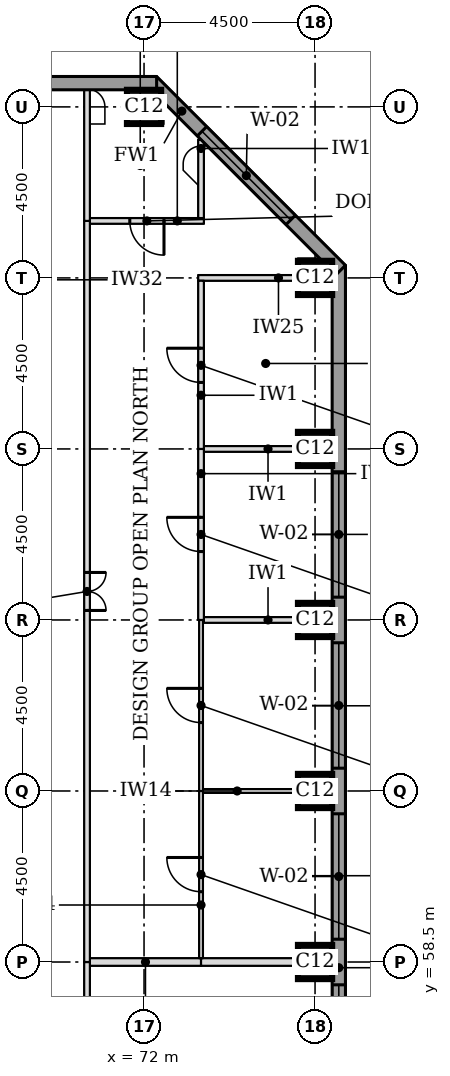
"""IFC4 building model, lengths in metres.
Left out: names, types, materials, properties, quantities, classifications, styles, units other than length and angle.
Written with IfcOpenShell. Run it as: python <this file> out.ifc"""

import sys

from ifc_helpers import new_model, si_unit, direction, frame, frame_2d, origin, origin_2d, place, context, subcontext, project, spatial, rectangle, extrude, element, fill, save


model = new_model("IFC4")
c1 = context("Model", 3, precision=1e-05, world=origin(), true_north=direction((0.0, 1.0)))
c2 = subcontext(c1, "Body", "Model", "MODEL_VIEW")
j1 = project(units=[si_unit("LENGTHUNIT", "METRE"), si_unit("PLANEANGLEUNIT", "RADIAN")], contexts=[c1])
p1 = place(None, origin())
s1 = spatial("IfcSite", under=j1, at=p1, CompositionType="ELEMENT")
p2 = place(p1, origin())
s2 = spatial("IfcBuilding", under=s1, at=p2, CompositionType="ELEMENT")
p3 = place(p2, frame((0.0, 0.0, 223.0)))
s3 = spatial("IfcBuildingStorey", under=s2, at=p3, CompositionType="ELEMENT", Elevation=223.0)
for number, where, z_axis, x_axis in (
    (1, (76.5, 58.5, 0.0), (0.0, 0.0, 1.0), (1.0, 0.0, 0.0)),
    (2, (76.5, 63.0, 0.0), (0.0, 0.0, 1.0), (1.0, 0.0, 0.0)),
    (3, (76.5, 67.5, 0.0), (0.0, 0.0, 1.0), (1.0, 0.0, 0.0)),
    (4, (76.5, 72.0, 0.0), (0.0, 0.0, 1.0), (1.0, 0.0, 0.0)),
    (5, (76.5, 76.5, 0.0), (0.0, 0.0, 1.0), (1.0, 0.0, 0.0)),
    (6, (72.0, 81.0, 0.0), (0.0, 0.0, 1.0), (1.0, 0.0, 0.0)),
):
    element("IfcColumn", number, at=place(p3, frame(where, z_axis=z_axis, x_axis=x_axis)), inside=s3, PredefinedType="COLUMN", context=c2, shape_type="SweptSolid", body=[
        extrude(rectangle(XDim=0.9, YDim=0.9, at=origin_2d()), origin(), (0.0, 0.0, 1.0), 3.7),
    ])
p4 = place(p3, frame((77.125, 44.669, 0.0), z_axis=(0.0, 0.0, 1.0), x_axis=(0.0, 1.0, 0.0)))
e7 = element("IfcWall", 7, at=p4, inside=s3, PredefinedType="STANDARD", context=c2, shape_type="SweptSolid", body=[
    extrude(rectangle(XDim=32.163, YDim=0.35, at=frame_2d((16.081, 0.0))), origin(), (0.0, 0.0, 1.0), 3.525),
])
p5 = place(p4, frame((5.431, 0.0, 0.9)))
e8 = element("IfcOpeningElement", 8, at=p5, cuts=e7, PredefinedType="OPENING", context=c2, shape_type="SweptSolid", body=[
    extrude(rectangle(XDim=3.3, YDim=1.9, at=frame_2d((1.65, 0.95))), frame((0.0, 0.185, 0.0), z_axis=(0.0, -1.0, 0.0), x_axis=(1.0, 0.0, 0.0)), (0.0, 0.0, 1.0), 0.37),
])
p6 = place(p4, frame((9.931, 0.0, 0.9)))
e9 = element("IfcOpeningElement", 9, at=p6, cuts=e7, PredefinedType="OPENING", context=c2, shape_type="SweptSolid", body=[
    extrude(rectangle(XDim=3.3, YDim=1.9, at=frame_2d((1.65, 0.95))), frame((0.0, 0.185, 0.0), z_axis=(0.0, -1.0, 0.0), x_axis=(1.0, 0.0, 0.0)), (0.0, 0.0, 1.0), 0.37),
])
p7 = place(p4, frame((14.431, 0.0, 0.9)))
e10 = element("IfcOpeningElement", 10, at=p7, cuts=e7, PredefinedType="OPENING", context=c2, shape_type="SweptSolid", body=[
    extrude(rectangle(XDim=3.3, YDim=1.9, at=frame_2d((1.65, 0.95))), frame((0.0, 0.185, 0.0), z_axis=(0.0, -1.0, 0.0), x_axis=(1.0, 0.0, 0.0)), (0.0, 0.0, 1.0), 0.37),
])
p8 = place(p4, frame((18.931, 0.0, 0.9)))
e11 = element("IfcOpeningElement", 11, at=p8, cuts=e7, PredefinedType="OPENING", context=c2, shape_type="SweptSolid", body=[
    extrude(rectangle(XDim=3.3, YDim=1.9, at=frame_2d((1.65, 0.95))), frame((0.0, 0.185, 0.0), z_axis=(0.0, -1.0, 0.0), x_axis=(1.0, 0.0, 0.0)), (0.0, 0.0, 1.0), 0.37),
])
p9 = place(p4, frame((23.431, 0.0, 0.9)))
e12 = element("IfcOpeningElement", 12, at=p9, cuts=e7, PredefinedType="OPENING", context=c2, shape_type="SweptSolid", body=[
    extrude(rectangle(XDim=3.3, YDim=1.9, at=frame_2d((1.65, 0.95))), frame((0.0, 0.185, 0.0), z_axis=(0.0, -1.0, 0.0), x_axis=(1.0, 0.0, 0.0)), (0.0, 0.0, 1.0), 0.37),
])
p10 = place(p3, frame((77.176, 76.708, 0.0), z_axis=(0.0, 0.0, 1.0), x_axis=(-0.707106781187, 0.707106781187, 0.0)))
e13 = element("IfcWall", 13, at=p10, inside=s3, PredefinedType="STANDARD", context=c2, shape_type="SweptSolid", body=[
    extrude(rectangle(XDim=7.027, YDim=0.35, at=frame_2d((3.513, 0.0))), origin(), (0.0, 0.0, 1.0), 3.525),
])
p11 = place(p10, frame((1.863, 0.0, 0.9)))
e14 = element("IfcOpeningElement", 14, at=p11, cuts=e13, PredefinedType="OPENING", context=c2, shape_type="SweptSolid", body=[
    extrude(rectangle(XDim=3.3, YDim=1.9, at=frame_2d((1.65, 0.95))), frame((0.0, 0.185, 0.0), z_axis=(0.0, -1.0, 0.0), x_axis=(1.0, 0.0, 0.0)), (0.0, 0.0, 1.0), 0.37),
])
p12 = place(p3, frame((72.331, 81.625, 0.0), z_axis=(0.0, 0.0, 1.0), x_axis=(-1.0, 0.0, 0.0)))
e15 = element("IfcWall", 15, at=p12, inside=s3, PredefinedType="STANDARD", context=c2, shape_type="SweptSolid", body=[
    extrude(rectangle(XDim=32.163, YDim=0.35, at=frame_2d((16.081, 0.0))), origin(), (0.0, 0.0, 1.0), 3.525),
])
p13 = place(p12, frame((5.431, 0.0, 0.9)))
e16 = element("IfcOpeningElement", 16, at=p13, cuts=e15, PredefinedType="OPENING", context=c2, shape_type="SweptSolid", body=[
    extrude(rectangle(XDim=3.3, YDim=1.9, at=frame_2d((1.65, 0.95))), frame((0.0, 0.185, 0.0), z_axis=(0.0, -1.0, 0.0), x_axis=(1.0, 0.0, 0.0)), (0.0, 0.0, 1.0), 0.37),
])
p14 = place(p12, frame((9.931, 0.0, 0.9)))
e17 = element("IfcOpeningElement", 17, at=p14, cuts=e15, PredefinedType="OPENING", context=c2, shape_type="SweptSolid", body=[
    extrude(rectangle(XDim=3.3, YDim=1.9, at=frame_2d((1.65, 0.95))), frame((0.0, 0.185, 0.0), z_axis=(0.0, -1.0, 0.0), x_axis=(1.0, 0.0, 0.0)), (0.0, 0.0, 1.0), 0.37),
])
p15 = place(p12, frame((14.431, 0.0, 0.9)))
e18 = element("IfcOpeningElement", 18, at=p15, cuts=e15, PredefinedType="OPENING", context=c2, shape_type="SweptSolid", body=[
    extrude(rectangle(XDim=3.3, YDim=1.9, at=frame_2d((1.65, 0.95))), frame((0.0, 0.185, 0.0), z_axis=(0.0, -1.0, 0.0), x_axis=(1.0, 0.0, 0.0)), (0.0, 0.0, 1.0), 0.37),
])
p16 = place(p12, frame((18.931, 0.0, 0.9)))
e19 = element("IfcOpeningElement", 19, at=p16, cuts=e15, PredefinedType="OPENING", context=c2, shape_type="SweptSolid", body=[
    extrude(rectangle(XDim=3.3, YDim=1.9, at=frame_2d((1.65, 0.95))), frame((0.0, 0.185, 0.0), z_axis=(0.0, -1.0, 0.0), x_axis=(1.0, 0.0, 0.0)), (0.0, 0.0, 1.0), 0.37),
])
p17 = place(p12, frame((23.431, 0.0, 0.9)))
e20 = element("IfcOpeningElement", 20, at=p17, cuts=e15, PredefinedType="OPENING", context=c2, shape_type="SweptSolid", body=[
    extrude(rectangle(XDim=3.3, YDim=1.9, at=frame_2d((1.65, 0.95))), frame((0.0, 0.185, 0.0), z_axis=(0.0, -1.0, 0.0), x_axis=(1.0, 0.0, 0.0)), (0.0, 0.0, 1.0), 0.37),
])
p18 = place(p3, frame((70.575, 58.5, 0.0), z_axis=(0.0, 0.0, 1.0), x_axis=(1.0, 0.0, 0.0)))
e21 = element("IfcWall", 21, at=p18, inside=s3, PredefinedType="PARTITIONING", context=c2, shape_type="SweptSolid", body=[
    extrude(rectangle(XDim=2.925, YDim=0.2, at=frame_2d((1.462, 0.0))), origin(), (0.0, 0.0, 1.0), 3.55),
])
p19 = place(p3, frame((73.5, 58.5, 0.0), z_axis=(0.0, 0.0, 1.0), x_axis=(1.0, 0.0, 0.0)))
e22 = element("IfcWall", 22, at=p19, inside=s3, PredefinedType="PARTITIONING", context=c2, shape_type="SweptSolid", body=[
    extrude(rectangle(XDim=3.45, YDim=0.2, at=frame_2d((1.725, 0.0))), origin(), (0.0, 0.0, 1.0), 3.55),
])
p20 = place(p3, frame((73.55, 63.0, 0.0), z_axis=(0.0, 0.0, 1.0), x_axis=(1.0, 0.0, 0.0)))
e23 = element("IfcWall", 23, at=p20, inside=s3, PredefinedType="PARTITIONING", context=c2, shape_type="SweptSolid", body=[
    extrude(rectangle(XDim=3.4, YDim=0.1, at=frame_2d((1.7, 0.0))), origin(), (0.0, 0.0, 1.0), 3.55),
])
for number, where, z_axis, x_axis in (
    (24, (73.575, 67.5, 0.0), (0.0, 0.0, 1.0), (1.0, 0.0, 0.0)),
    (25, (73.575, 72.0, 0.0), (0.0, 0.0, 1.0), (1.0, 0.0, 0.0)),
):
    element("IfcWall", number, at=place(p3, frame(where, z_axis=z_axis, x_axis=x_axis)), inside=s3, PredefinedType="PARTITIONING", context=c2, shape_type="SweptSolid", body=[
        extrude(rectangle(XDim=3.375, YDim=0.15, at=frame_2d((1.688, 0.0))), origin(), (0.0, 0.0, 1.0), 3.55),
    ])
p21 = place(p3, frame((73.425, 76.5, 0.0), z_axis=(0.0, 0.0, 1.0), x_axis=(1.0, 0.0, 0.0)))
e26 = element("IfcWall", 26, at=p21, inside=s3, PredefinedType="PARTITIONING", context=c2, shape_type="SweptSolid", body=[
    extrude(rectangle(XDim=2.625, YDim=0.15, at=frame_2d((1.312, 0.0))), origin(), (0.0, 0.0, 1.0), 3.096),
])
p22 = place(p3, frame((70.575, 78.0, 0.0), z_axis=(0.0, 0.0, 1.0), x_axis=(1.0, 0.0, 0.0)))
e27 = element("IfcWall", 27, at=p22, inside=s3, PredefinedType="PARTITIONING", context=c2, shape_type="SweptSolid", body=[
    extrude(rectangle(XDim=3.0, YDim=0.15, at=frame_2d((1.5, 0.0))), origin(), (0.0, 0.0, 1.0), 3.55),
])
p23 = place(p22, frame((1.05, 0.0, 0.0)))
e28 = element("IfcOpeningElement", 28, at=p23, cuts=e27, PredefinedType="OPENING", context=c2, shape_type="SweptSolid", body=[
    extrude(rectangle(XDim=0.9, YDim=2.1, at=frame_2d((0.45, 1.05))), frame((0.0, 0.085, 0.0), z_axis=(0.0, -1.0, 0.0), x_axis=(1.0, 0.0, 0.0)), (0.0, 0.0, 1.0), 0.17),
])
p24 = place(p3, frame((70.5, 45.0, 0.0), z_axis=(0.0, 0.0, 1.0), x_axis=(0.0, 1.0, 0.0)))
e29 = element("IfcWall", 29, at=p24, inside=s3, PredefinedType="PARTITIONING", context=c2, shape_type="SweptSolid", body=[
    extrude(rectangle(XDim=13.5, YDim=0.15, at=frame_2d((6.75, 0.0))), origin(), (0.0, 0.0, 1.0), 3.55),
])
p25 = place(p24, frame((6.25, 0.0, 0.0)))
e30 = element("IfcOpeningElement", 30, at=p25, cuts=e29, PredefinedType="OPENING", context=c2, shape_type="SweptSolid", body=[
    extrude(rectangle(XDim=1.0, YDim=2.1, at=frame_2d((0.5, 1.05))), frame((0.0, 0.085, 0.0), z_axis=(0.0, -1.0, 0.0), x_axis=(1.0, 0.0, 0.0)), (0.0, 0.0, 1.0), 0.17),
])
p26 = place(p3, frame((70.5, 58.5, 0.0), z_axis=(0.0, 0.0, 1.0), x_axis=(0.0, 1.0, 0.0)))
e31 = element("IfcWall", 31, at=p26, inside=s3, PredefinedType="PARTITIONING", context=c2, shape_type="SweptSolid", body=[
    extrude(rectangle(XDim=19.5, YDim=0.15, at=frame_2d((9.75, 0.0))), origin(), (0.0, 0.0, 1.0), 3.55),
])
p27 = place(p26, frame((9.25, 0.0, 0.0)))
e32 = element("IfcOpeningElement", 32, at=p27, cuts=e31, PredefinedType="OPENING", context=c2, shape_type="SweptSolid", body=[
    extrude(rectangle(XDim=1.0, YDim=2.1, at=frame_2d((0.5, 1.05))), frame((0.0, 0.085, 0.0), z_axis=(0.0, -1.0, 0.0), x_axis=(1.0, 0.0, 0.0)), (0.0, 0.0, 1.0), 0.17),
])
p28 = place(p3, frame((73.5, 58.6, 0.0), z_axis=(0.0, 0.0, 1.0), x_axis=(0.0, 1.0, 0.0)))
e33 = element("IfcWall", 33, at=p28, inside=s3, PredefinedType="PARTITIONING", context=c2, shape_type="SweptSolid", body=[
    extrude(rectangle(XDim=4.4, YDim=0.1, at=frame_2d((2.2, 0.0))), origin(), (0.0, 0.0, 1.0), 3.55),
])
p29 = place(p28, frame((1.75, 0.0, 0.0)))
e34 = element("IfcOpeningElement", 34, at=p29, cuts=e33, PredefinedType="OPENING", context=c2, shape_type="SweptSolid", body=[
    extrude(rectangle(XDim=0.9, YDim=2.1, at=frame_2d((0.45, 1.05))), frame((0.0, 0.06, 0.0), z_axis=(0.0, -1.0, 0.0), x_axis=(1.0, 0.0, 0.0)), (0.0, 0.0, 1.0), 0.12),
])
p30 = place(p3, frame((73.5, 63.0, 0.0), z_axis=(0.0, 0.0, 1.0), x_axis=(0.0, 1.0, 0.0)))
e35 = element("IfcWall", 35, at=p30, inside=s3, PredefinedType="PARTITIONING", context=c2, shape_type="SweptSolid", body=[
    extrude(rectangle(XDim=4.5, YDim=0.1, at=frame_2d((2.25, 0.0))), origin(), (0.0, 0.0, 1.0), 3.55),
])
p31 = place(p30, frame((1.8, 0.0, 0.0)))
e36 = element("IfcOpeningElement", 36, at=p31, cuts=e35, PredefinedType="OPENING", context=c2, shape_type="SweptSolid", body=[
    extrude(rectangle(XDim=0.9, YDim=2.1, at=frame_2d((0.45, 1.05))), frame((0.0, 0.06, 0.0), z_axis=(0.0, -1.0, 0.0), x_axis=(1.0, 0.0, 0.0)), (0.0, 0.0, 1.0), 0.12),
])
p32 = place(p3, frame((73.5, 67.5, 0.0), z_axis=(0.0, 0.0, 1.0), x_axis=(0.0, 1.0, 0.0)))
e37 = element("IfcWall", 37, at=p32, inside=s3, PredefinedType="PARTITIONING", context=c2, shape_type="SweptSolid", body=[
    extrude(rectangle(XDim=4.5, YDim=0.15, at=frame_2d((2.25, 0.0))), origin(), (0.0, 0.0, 1.0), 3.55),
])
p33 = place(p32, frame((1.8, 0.0, 0.0)))
e38 = element("IfcOpeningElement", 38, at=p33, cuts=e37, PredefinedType="OPENING", context=c2, shape_type="SweptSolid", body=[
    extrude(rectangle(XDim=0.9, YDim=2.1, at=frame_2d((0.45, 1.05))), frame((0.0, 0.085, 0.0), z_axis=(0.0, -1.0, 0.0), x_axis=(1.0, 0.0, 0.0)), (0.0, 0.0, 1.0), 0.17),
])
p34 = place(p3, frame((73.5, 72.0, 0.0), z_axis=(0.0, 0.0, 1.0), x_axis=(0.0, 1.0, 0.0)))
e39 = element("IfcWall", 39, at=p34, inside=s3, PredefinedType="PARTITIONING", context=c2, shape_type="SweptSolid", body=[
    extrude(rectangle(XDim=4.425, YDim=0.15, at=frame_2d((2.212, 0.0))), origin(), (0.0, 0.0, 1.0), 3.55),
])
p35 = place(p34, frame((1.75, 0.0, 0.0)))
e40 = element("IfcOpeningElement", 40, at=p35, cuts=e39, PredefinedType="OPENING", context=c2, shape_type="SweptSolid", body=[
    extrude(rectangle(XDim=0.9, YDim=2.1, at=frame_2d((0.45, 1.05))), frame((0.0, 0.085, 0.0), z_axis=(0.0, -1.0, 0.0), x_axis=(1.0, 0.0, 0.0)), (0.0, 0.0, 1.0), 0.17),
])
p36 = place(p3, frame((70.5, 78.0, 0.0), z_axis=(0.0, 0.0, 1.0), x_axis=(0.0, 1.0, 0.0)))
e41 = element("IfcWall", 41, at=p36, inside=s3, PredefinedType="PARTITIONING", context=c2, shape_type="SweptSolid", body=[
    extrude(rectangle(XDim=3.45, YDim=0.15, at=frame_2d((1.725, 0.0))), origin(), (0.0, 0.0, 1.0), 3.55),
])
p37 = place(p3, frame((73.5, 78.075, 0.0), z_axis=(0.0, 0.0, 1.0), x_axis=(0.0, 1.0, 0.0)))
e42 = element("IfcWall", 42, at=p37, inside=s3, PredefinedType="PARTITIONING", context=c2, shape_type="SweptSolid", body=[
    extrude(rectangle(XDim=2.062, YDim=0.15, at=frame_2d((1.031, 0.0))), origin(), (0.0, 0.0, 1.0), 3.55),
])
p38 = place(p6, origin())
e43 = element("IfcWindow", 43, at=p38, inside=s3, PartitioningType="SINGLE_PANEL", PredefinedType="WINDOW", context=c2, shape_type="SweptSolid", body=[
    extrude(rectangle(XDim=3.3, YDim=1.9, at=frame_2d((1.65, 0.95))), frame((0.0, 0.085, 0.0), z_axis=(0.0, -1.0, 0.0), x_axis=(1.0, 0.0, 0.0)), (0.0, 0.0, 1.0), 0.06),
])
fill(e9, e43)
p39 = place(p7, origin())
e44 = element("IfcWindow", 44, at=p39, inside=s3, PartitioningType="SINGLE_PANEL", PredefinedType="WINDOW", context=c2, shape_type="SweptSolid", body=[
    extrude(rectangle(XDim=3.3, YDim=1.9, at=frame_2d((1.65, 0.95))), frame((0.0, 0.085, 0.0), z_axis=(0.0, -1.0, 0.0), x_axis=(1.0, 0.0, 0.0)), (0.0, 0.0, 1.0), 0.06),
])
fill(e10, e44)
p40 = place(p8, origin())
e45 = element("IfcWindow", 45, at=p40, inside=s3, PartitioningType="SINGLE_PANEL", PredefinedType="WINDOW", context=c2, shape_type="SweptSolid", body=[
    extrude(rectangle(XDim=3.3, YDim=1.9, at=frame_2d((1.65, 0.95))), frame((0.0, 0.085, 0.0), z_axis=(0.0, -1.0, 0.0), x_axis=(1.0, 0.0, 0.0)), (0.0, 0.0, 1.0), 0.06),
])
fill(e11, e45)
p41 = place(p9, origin())
e46 = element("IfcWindow", 46, at=p41, inside=s3, PartitioningType="SINGLE_PANEL", PredefinedType="WINDOW", context=c2, shape_type="SweptSolid", body=[
    extrude(rectangle(XDim=3.3, YDim=1.9, at=frame_2d((1.65, 0.95))), frame((0.0, 0.085, 0.0), z_axis=(0.0, -1.0, 0.0), x_axis=(1.0, 0.0, 0.0)), (0.0, 0.0, 1.0), 0.06),
])
fill(e12, e46)
p42 = place(p11, origin())
e47 = element("IfcWindow", 47, at=p42, inside=s3, PartitioningType="SINGLE_PANEL", PredefinedType="WINDOW", context=c2, shape_type="SweptSolid", body=[
    extrude(rectangle(XDim=3.3, YDim=1.9, at=frame_2d((1.65, 0.95))), frame((0.0, 0.085, 0.0), z_axis=(0.0, -1.0, 0.0), x_axis=(1.0, 0.0, 0.0)), (0.0, 0.0, 1.0), 0.06),
])
fill(e14, e47)
p43 = place(p27, frame((1.0, 0.0, 0.0), z_axis=(0.0, 0.0, 1.0), x_axis=(-1.0, 0.0, 0.0)))
e48 = element("IfcDoor", 48, at=p43, inside=s3, OperationType="DOUBLE_DOOR_SINGLE_SWING", PredefinedType="DOOR", context=c2, shape_type="SweptSolid", body=[
    extrude(rectangle(XDim=1.0, YDim=2.1, at=frame_2d((0.5, 1.05))), frame((0.0, 0.025, 0.0), z_axis=(0.0, -1.0, 0.0), x_axis=(1.0, 0.0, 0.0)), (0.0, 0.0, 1.0), 0.05),
])
fill(e32, e48)
p44 = place(p29, origin())
e49 = element("IfcDoor", 49, at=p44, inside=s3, OperationType="SINGLE_SWING_RIGHT", PredefinedType="DOOR", context=c2, shape_type="SweptSolid", body=[
    extrude(rectangle(XDim=0.9, YDim=2.1, at=frame_2d((0.45, 1.05))), frame((0.0, 0.025, 0.0), z_axis=(0.0, -1.0, 0.0), x_axis=(1.0, 0.0, 0.0)), (0.0, 0.0, 1.0), 0.05),
])
fill(e34, e49)
p45 = place(p31, origin())
e50 = element("IfcDoor", 50, at=p45, inside=s3, OperationType="SINGLE_SWING_RIGHT", PredefinedType="DOOR", context=c2, shape_type="SweptSolid", body=[
    extrude(rectangle(XDim=0.9, YDim=2.1, at=frame_2d((0.45, 1.05))), frame((0.0, 0.025, 0.0), z_axis=(0.0, -1.0, 0.0), x_axis=(1.0, 0.0, 0.0)), (0.0, 0.0, 1.0), 0.05),
])
fill(e36, e50)
p46 = place(p23, frame((0.9, 0.0, 0.0), z_axis=(0.0, 0.0, 1.0), x_axis=(-1.0, 0.0, 0.0)))
e51 = element("IfcDoor", 51, at=p46, inside=s3, OperationType="SINGLE_SWING_LEFT", PredefinedType="DOOR", context=c2, shape_type="SweptSolid", body=[
    extrude(rectangle(XDim=0.9, YDim=2.1, at=frame_2d((0.45, 1.05))), frame((0.0, 0.025, 0.0), z_axis=(0.0, -1.0, 0.0), x_axis=(1.0, 0.0, 0.0)), (0.0, 0.0, 1.0), 0.05),
])
fill(e28, e51)
p47 = place(p33, origin())
e52 = element("IfcDoor", 52, at=p47, inside=s3, OperationType="SINGLE_SWING_RIGHT", PredefinedType="DOOR", context=c2, shape_type="SweptSolid", body=[
    extrude(rectangle(XDim=0.9, YDim=2.1, at=frame_2d((0.45, 1.05))), frame((0.0, 0.025, 0.0), z_axis=(0.0, -1.0, 0.0), x_axis=(1.0, 0.0, 0.0)), (0.0, 0.0, 1.0), 0.05),
])
fill(e38, e52)
p48 = place(p35, origin())
e53 = element("IfcDoor", 53, at=p48, inside=s3, OperationType="SINGLE_SWING_RIGHT", PredefinedType="DOOR", context=c2, shape_type="SweptSolid", body=[
    extrude(rectangle(XDim=0.9, YDim=2.1, at=frame_2d((0.45, 1.05))), frame((0.0, 0.025, 0.0), z_axis=(0.0, -1.0, 0.0), x_axis=(1.0, 0.0, 0.0)), (0.0, 0.0, 1.0), 0.05),
])
fill(e40, e53)
save(model, sys.argv[1])
